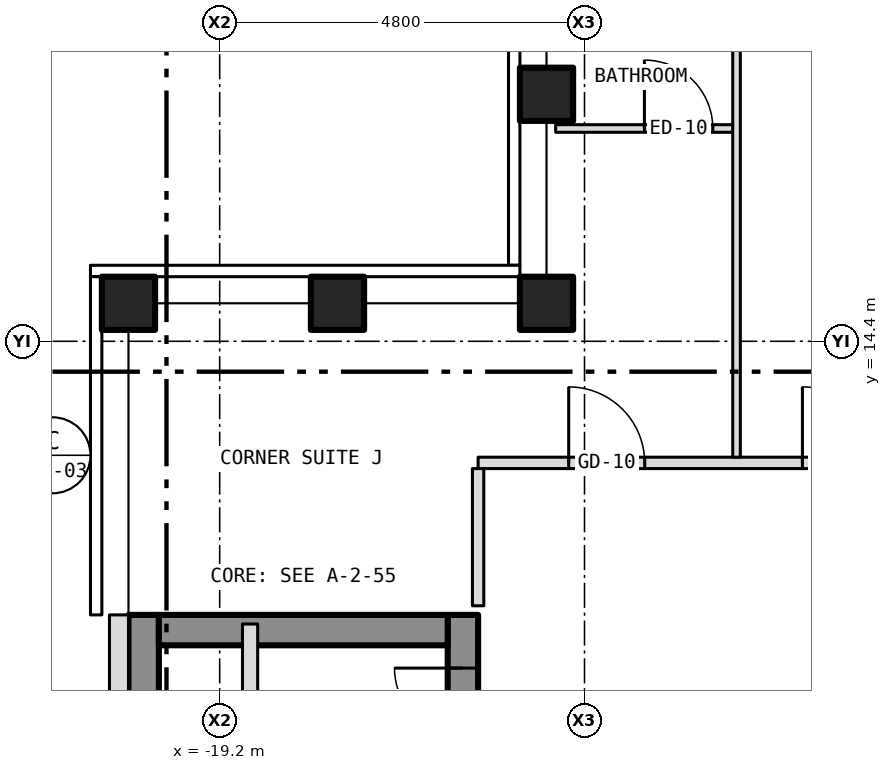
"""IFC4 building model, lengths in metres.
Left out: names, types, materials, properties, quantities, classifications, styles, units other than length and angle.
Written with IfcOpenShell. Run it as: python <this file> out.ifc"""

import sys

from ifc_helpers import new_model, si_unit, direction, frame, frame_2d, origin, origin_2d, place, context, subcontext, project, spatial, rectangle, hollow_rectangle, extrude, element, fill, save


model = new_model("IFC4")
c1 = context("Model", 3, precision=1e-05, world=origin(), true_north=direction((0.0, 1.0)))
c2 = subcontext(c1, "Body", "Model", "MODEL_VIEW")
j1 = project(units=[si_unit("LENGTHUNIT", "METRE"), si_unit("PLANEANGLEUNIT", "RADIAN")], contexts=[c1])
p1 = place(None, origin())
s1 = spatial("IfcSite", under=j1, at=p1, CompositionType="ELEMENT")
p2 = place(p1, origin())
s2 = spatial("IfcBuilding", under=s1, at=p2, CompositionType="ELEMENT")
p3 = place(p2, frame((0.0, 0.0, 201.5)))
s3 = spatial("IfcBuildingStorey", under=s2, at=p3, CompositionType="ELEMENT", Elevation=201.5)
for number, where, z_axis, x_axis in (
    (1, (-20.4, 14.9, -0.15), (0.0, 0.0, 1.0), (1.0, 0.0, 0.0)),
    (2, (-14.9, 14.9, -0.15), (0.0, 0.0, 1.0), (1.0, 0.0, 0.0)),
    (3, (-14.9, 17.65, -0.15), (0.0, 0.0, 1.0), (1.0, 0.0, 0.0)),
    (4, (-17.65, 14.9, -0.15), (0.0, 0.0, 1.0), (1.0, 0.0, 0.0)),
):
    element("IfcColumn", number, at=place(p3, frame(where, z_axis=z_axis, x_axis=x_axis)), inside=s3, PredefinedType="COLUMN", context=c2, shape_type="SweptSolid", body=[
        extrude(hollow_rectangle(XDim=0.7, YDim=0.7, WallThickness=0.04, at=origin_2d()), origin(), (0.0, 0.0, 1.0), 3.5),
    ])
p4 = place(p3, frame((-16.0, -10.8, 0.0), z_axis=(0.0, 0.0, 1.0), x_axis=(0.0, 1.0, 0.0)))
e5 = element("IfcWall", 5, at=p4, inside=s3, PredefinedType="SHEAR", context=c2, shape_type="SweptSolid", body=[
    extrude(rectangle(XDim=21.6, YDim=0.4, at=frame_2d((10.8, 0.0))), origin(), (0.0, 0.0, 1.0), 3.25),
])
p5 = place(p4, frame((9.4, 0.0, 0.0)))
e6 = element("IfcOpeningElement", 6, at=p5, cuts=e5, PredefinedType="OPENING", context=c2, shape_type="SweptSolid", body=[
    extrude(rectangle(XDim=1.1, YDim=2.1, at=frame_2d((0.55, 1.05))), frame((0.0, 0.212, 0.0), z_axis=(0.0, -1.0, 0.0), x_axis=(1.0, 0.0, 0.0)), (0.0, 0.0, 1.0), 0.424),
])
p6 = place(p4, frame((11.5, 0.0, 0.0)))
e7 = element("IfcOpeningElement", 7, at=p6, cuts=e5, PredefinedType="OPENING", context=c2, shape_type="SweptSolid", body=[
    extrude(rectangle(XDim=1.1, YDim=2.1, at=frame_2d((0.55, 1.05))), frame((0.0, 0.212, 0.0), z_axis=(0.0, -1.0, 0.0), x_axis=(1.0, 0.0, 0.0)), (0.0, 0.0, 1.0), 0.424),
])
p7 = place(p4, frame((13.6, 0.0, 0.0)))
e8 = element("IfcOpeningElement", 8, at=p7, cuts=e5, PredefinedType="OPENING", context=c2, shape_type="SweptSolid", body=[
    extrude(rectangle(XDim=1.1, YDim=2.1, at=frame_2d((0.55, 1.05))), frame((0.0, 0.212, 0.0), z_axis=(0.0, -1.0, 0.0), x_axis=(1.0, 0.0, 0.0)), (0.0, 0.0, 1.0), 0.424),
])
p8 = place(p4, frame((15.7, 0.0, 0.0)))
e9 = element("IfcOpeningElement", 9, at=p8, cuts=e5, PredefinedType="OPENING", context=c2, shape_type="SweptSolid", body=[
    extrude(rectangle(XDim=1.1, YDim=2.1, at=frame_2d((0.55, 1.05))), frame((0.0, 0.212, 0.0), z_axis=(0.0, -1.0, 0.0), x_axis=(1.0, 0.0, 0.0)), (0.0, 0.0, 1.0), 0.424),
])
p9 = place(p4, frame((17.8, 0.0, 0.0)))
e10 = element("IfcOpeningElement", 10, at=p9, cuts=e5, PredefinedType="OPENING", context=c2, shape_type="SweptSolid", body=[
    extrude(rectangle(XDim=1.1, YDim=2.1, at=frame_2d((0.55, 1.05))), frame((0.0, 0.212, 0.0), z_axis=(0.0, -1.0, 0.0), x_axis=(1.0, 0.0, 0.0)), (0.0, 0.0, 1.0), 0.424),
])
p10 = place(p4, frame((0.458, 0.0, 0.0)))
e11 = element("IfcOpeningElement", 11, at=p10, cuts=e5, PredefinedType="OPENING", context=c2, shape_type="SweptSolid", body=[
    extrude(rectangle(XDim=1.1, YDim=2.1, at=frame_2d((0.55, 1.05))), frame((0.0, 0.212, 0.0), z_axis=(0.0, -1.0, 0.0), x_axis=(1.0, 0.0, 0.0)), (0.0, 0.0, 1.0), 0.424),
])
p11 = place(p4, frame((7.5, 0.0, 0.0)))
e12 = element("IfcOpeningElement", 12, at=p11, cuts=e5, PredefinedType="OPENING", context=c2, shape_type="SweptSolid", body=[
    extrude(rectangle(XDim=1.1, YDim=2.1, at=frame_2d((0.55, 1.05))), frame((0.0, 0.212, 0.0), z_axis=(0.0, -1.0, 0.0), x_axis=(1.0, 0.0, 0.0)), (0.0, 0.0, 1.0), 0.424),
])
p12 = place(p4, frame((20.0, 0.0, 0.0)))
e13 = element("IfcOpeningElement", 13, at=p12, cuts=e5, PredefinedType="OPENING", context=c2, shape_type="SweptSolid", body=[
    extrude(rectangle(XDim=0.9, YDim=2.1, at=frame_2d((0.45, 1.05))), frame((0.0, 0.212, 0.0), z_axis=(0.0, -1.0, 0.0), x_axis=(1.0, 0.0, 0.0)), (0.0, 0.0, 1.0), 0.424),
])
p13 = place(p3, frame((-20.2, -10.8, 0.0), z_axis=(0.0, 0.0, 1.0), x_axis=(0.0, 1.0, 0.0)))
e14 = element("IfcWall", 14, at=p13, inside=s3, PredefinedType="SHEAR", context=c2, shape_type="SweptSolid", body=[
    extrude(rectangle(XDim=21.6, YDim=0.4, at=frame_2d((10.8, 0.0))), origin(), (0.0, 0.0, 1.0), 3.25),
])
p14 = place(p3, frame((-20.0, 10.6, 0.0), z_axis=(0.0, 0.0, 1.0), x_axis=(1.0, 0.0, 0.0)))
e15 = element("IfcWall", 15, at=p14, inside=s3, PredefinedType="SHEAR", context=c2, shape_type="SweptSolid", body=[
    extrude(rectangle(XDim=3.8, YDim=0.4, at=frame_2d((1.9, 0.0))), origin(), (0.0, 0.0, 1.0), 3.25),
])
p15 = place(p3, frame((-20.525, 10.8, 0.0), z_axis=(0.0, 0.0, 1.0), x_axis=(0.0, -1.0, 0.0)))
e16 = element("IfcWall", 16, at=p15, inside=s3, PredefinedType="SOLIDWALL", context=c2, shape_type="SweptSolid", body=[
    extrude(rectangle(XDim=21.6, YDim=0.25, at=frame_2d((10.8, 0.0))), origin(), (0.0, 0.0, 1.0), 3.5),
])
p16 = place(p15, frame((18.05, 0.0, 1.0)))
e17 = element("IfcOpeningElement", 17, at=p16, cuts=e16, PredefinedType="OPENING", context=c2, shape_type="SweptSolid", body=[
    extrude(rectangle(XDim=0.6, YDim=1.5, at=frame_2d((0.3, 0.75))), frame((0.0, 0.137, 0.0), z_axis=(0.0, -1.0, 0.0), x_axis=(1.0, 0.0, 0.0)), (0.0, 0.0, 1.0), 0.274),
])
p17 = place(p3, frame((-15.8, 12.8, 0.0), z_axis=(0.0, 0.0, 1.0), x_axis=(1.0, 0.0, 0.0)))
e18 = element("IfcWall", 18, at=p17, inside=s3, PredefinedType="PARTITIONING", context=c2, shape_type="SweptSolid", body=[
    extrude(rectangle(XDim=31.6, YDim=0.15, at=frame_2d((15.8, 0.0))), origin(), (0.0, 0.0, 1.0), 3.35),
])
p18 = place(p17, frame((4.267, 0.0, 0.0)))
e19 = element("IfcOpeningElement", 19, at=p18, cuts=e18, PredefinedType="OPENING", context=c2, shape_type="SweptSolid", body=[
    extrude(rectangle(XDim=1.0, YDim=2.1, at=frame_2d((0.5, 1.05))), frame((0.0, 0.087, 0.0), z_axis=(0.0, -1.0, 0.0), x_axis=(1.0, 0.0, 0.0)), (0.0, 0.0, 1.0), 0.174),
])
p19 = place(p17, frame((12.675, 0.0, 0.0)))
e20 = element("IfcOpeningElement", 20, at=p19, cuts=e18, PredefinedType="OPENING", context=c2, shape_type="SweptSolid", body=[
    extrude(rectangle(XDim=1.0, YDim=2.1, at=frame_2d((0.5, 1.05))), frame((0.0, 0.087, 0.0), z_axis=(0.0, -1.0, 0.0), x_axis=(1.0, 0.0, 0.0)), (0.0, 0.0, 1.0), 0.174),
])
p20 = place(p17, frame((16.684, 0.0, 0.0)))
e21 = element("IfcOpeningElement", 21, at=p20, cuts=e18, PredefinedType="OPENING", context=c2, shape_type="SweptSolid", body=[
    extrude(rectangle(XDim=1.0, YDim=2.1, at=frame_2d((0.5, 1.05))), frame((0.0, 0.087, 0.0), z_axis=(0.0, -1.0, 0.0), x_axis=(1.0, 0.0, 0.0)), (0.0, 0.0, 1.0), 0.174),
])
p21 = place(p17, frame((25.092, 0.0, 0.0)))
e22 = element("IfcOpeningElement", 22, at=p21, cuts=e18, PredefinedType="OPENING", context=c2, shape_type="SweptSolid", body=[
    extrude(rectangle(XDim=1.0, YDim=2.1, at=frame_2d((0.5, 1.05))), frame((0.0, 0.087, 0.0), z_axis=(0.0, -1.0, 0.0), x_axis=(1.0, 0.0, 0.0)), (0.0, 0.0, 1.0), 0.174),
])
p22 = place(p17, frame((1.192, 0.0, 0.0)))
e23 = element("IfcOpeningElement", 23, at=p22, cuts=e18, PredefinedType="OPENING", context=c2, shape_type="SweptSolid", body=[
    extrude(rectangle(XDim=1.0, YDim=2.1, at=frame_2d((0.5, 1.05))), frame((0.0, 0.087, 0.0), z_axis=(0.0, -1.0, 0.0), x_axis=(1.0, 0.0, 0.0)), (0.0, 0.0, 1.0), 0.174),
])
p23 = place(p17, frame((29.409, 0.0, 0.0)))
e24 = element("IfcOpeningElement", 24, at=p23, cuts=e18, PredefinedType="OPENING", context=c2, shape_type="SweptSolid", body=[
    extrude(rectangle(XDim=1.0, YDim=2.1, at=frame_2d((0.5, 1.05))), frame((0.0, 0.087, 0.0), z_axis=(0.0, -1.0, 0.0), x_axis=(1.0, 0.0, 0.0)), (0.0, 0.0, 1.0), 0.174),
])
p24 = place(p3, frame((-14.78, 17.2, 0.0), z_axis=(0.0, 0.0, 1.0), x_axis=(1.0, 0.0, 0.0)))
e25 = element("IfcWall", 25, at=p24, inside=s3, PredefinedType="PARTITIONING", context=c2, shape_type="SweptSolid", body=[
    extrude(rectangle(XDim=2.38, YDim=0.1, at=frame_2d((1.19, 0.0))), origin(), (0.0, 0.0, 1.0), 3.35),
])
p25 = place(p24, frame((1.168, 0.0, 0.0)))
e26 = element("IfcOpeningElement", 26, at=p25, cuts=e25, PredefinedType="OPENING", context=c2, shape_type="SweptSolid", body=[
    extrude(rectangle(XDim=0.9, YDim=2.1, at=frame_2d((0.45, 1.05))), frame((0.0, 0.062, 0.0), z_axis=(0.0, -1.0, 0.0), x_axis=(1.0, 0.0, 0.0)), (0.0, 0.0, 1.0), 0.124),
])
p26 = place(p3, frame((-18.8, -1.8, 0.0), z_axis=(0.0, 0.0, 1.0), x_axis=(0.0, 1.0, 0.0)))
e27 = element("IfcWall", 27, at=p26, inside=s3, PredefinedType="PARTITIONING", context=c2, shape_type="SweptSolid", body=[
    extrude(rectangle(XDim=12.48, YDim=0.2, at=frame_2d((6.24, 0.0))), origin(), (0.0, 0.0, 1.0), 3.25),
])
p27 = place(p3, frame((-15.8, 10.92, 0.0), z_axis=(0.0, 0.0, 1.0), x_axis=(0.0, 1.0, 0.0)))
e28 = element("IfcWall", 28, at=p27, inside=s3, PredefinedType="PARTITIONING", context=c2, shape_type="SweptSolid", body=[
    extrude(rectangle(XDim=1.805, YDim=0.15, at=frame_2d((0.903, 0.0))), origin(), (0.0, 0.0, 1.0), 3.35),
])
p28 = place(p3, frame((-12.4, 12.875, 0.0), z_axis=(0.0, 0.0, 1.0), x_axis=(0.0, 1.0, 0.0)))
e29 = element("IfcWall", 29, at=p28, inside=s3, PredefinedType="PARTITIONING", context=c2, shape_type="SweptSolid", body=[
    extrude(rectangle(XDim=7.905, YDim=0.1, at=frame_2d((3.953, 0.0))), origin(), (0.0, 0.0, 1.0), 3.35),
])
p29 = place(p12, origin())
e30 = element("IfcDoor", 30, at=p29, inside=s3, OperationType="SINGLE_SWING_RIGHT", PredefinedType="DOOR", context=c2, shape_type="SweptSolid", body=[
    extrude(rectangle(XDim=0.9, YDim=2.1, at=frame_2d((0.45, 1.05))), frame((0.0, 0.025, 0.0), z_axis=(0.0, -1.0, 0.0), x_axis=(1.0, 0.0, 0.0)), (0.0, 0.0, 1.0), 0.05),
])
fill(e13, e30)
p30 = place(p18, origin())
e31 = element("IfcDoor", 31, at=p30, inside=s3, OperationType="SINGLE_SWING_LEFT", PredefinedType="DOOR", context=c2, shape_type="SweptSolid", body=[
    extrude(rectangle(XDim=1.0, YDim=2.1, at=frame_2d((0.5, 1.05))), frame((0.0, 0.025, 0.0), z_axis=(0.0, -1.0, 0.0), x_axis=(1.0, 0.0, 0.0)), (0.0, 0.0, 1.0), 0.05),
])
fill(e19, e31)
p31 = place(p25, origin())
e32 = element("IfcDoor", 32, at=p31, inside=s3, OperationType="SINGLE_SWING_LEFT", PredefinedType="DOOR", context=c2, shape_type="SweptSolid", body=[
    extrude(rectangle(XDim=0.9, YDim=2.1, at=frame_2d((0.45, 1.05))), frame((0.0, 0.025, 0.0), z_axis=(0.0, -1.0, 0.0), x_axis=(1.0, 0.0, 0.0)), (0.0, 0.0, 1.0), 0.05),
])
fill(e26, e32)
p32 = place(p22, origin())
e33 = element("IfcDoor", 33, at=p32, inside=s3, OperationType="SINGLE_SWING_LEFT", PredefinedType="DOOR", context=c2, shape_type="SweptSolid", body=[
    extrude(rectangle(XDim=1.0, YDim=2.1, at=frame_2d((0.5, 1.05))), frame((0.0, 0.025, 0.0), z_axis=(0.0, -1.0, 0.0), x_axis=(1.0, 0.0, 0.0)), (0.0, 0.0, 1.0), 0.05),
])
fill(e23, e33)
save(model, sys.argv[1])
